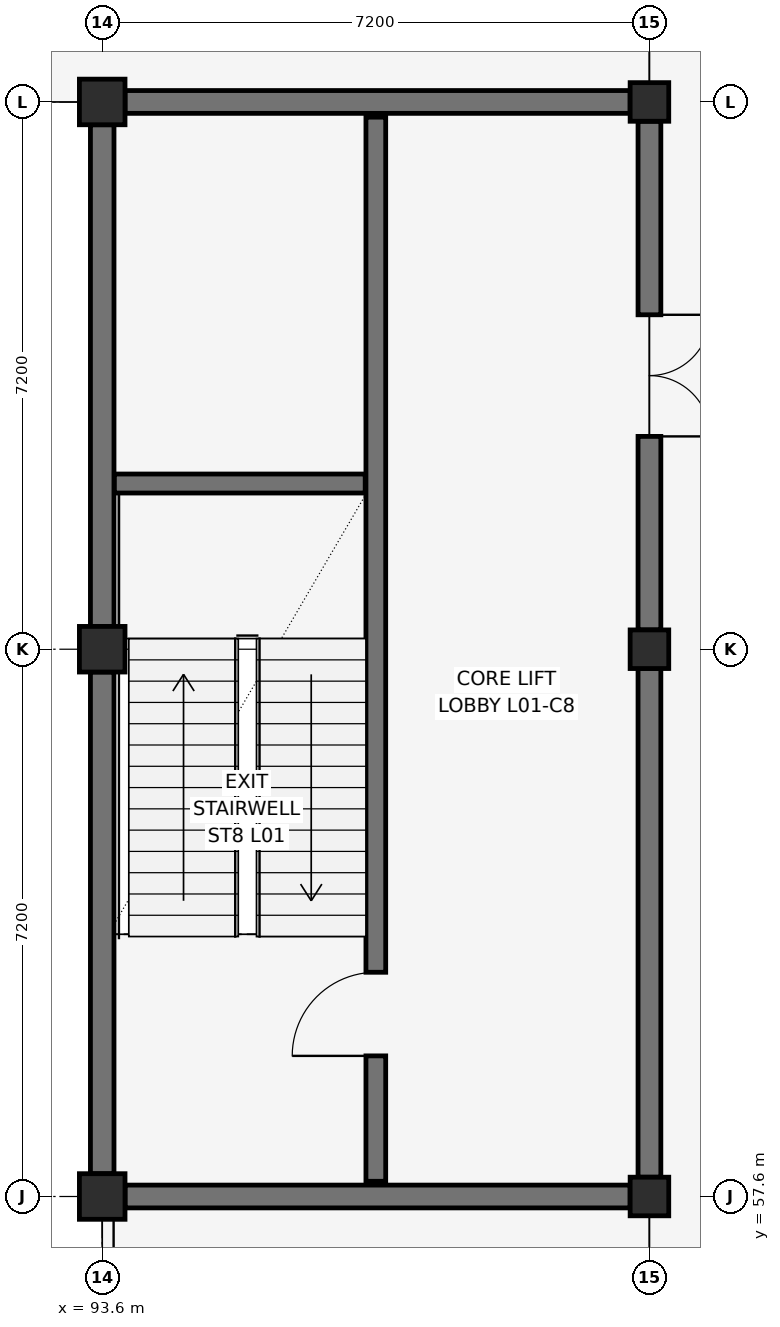
"""IFC4 building model, lengths in metres.
Left out: names, types, materials, properties, quantities, classifications, styles, units other than length and angle.
Written with IfcOpenShell. Run it as: python <this file> out.ifc"""

import sys

from ifc_helpers import new_model, si_unit, direction, frame, frame_2d, origin, origin_2d, place, context, subcontext, project, spatial, rectangle, hollow_circle, extrude, element, fill, save


model = new_model("IFC4")
c1 = context("Model", 3, precision=1e-05, world=origin(), true_north=direction((0.0, 1.0)))
c2 = subcontext(c1, "Body", "Model", "MODEL_VIEW")
j1 = project(units=[si_unit("LENGTHUNIT", "METRE"), si_unit("PLANEANGLEUNIT", "RADIAN")], contexts=[c1])
p1 = place(None, origin())
s1 = spatial("IfcSite", under=j1, at=p1, CompositionType="ELEMENT")
p2 = place(p1, origin())
s2 = spatial("IfcBuilding", under=s1, at=p2, CompositionType="ELEMENT")
p3 = place(p2, frame((0.0, 0.0, 5.4)))
s3 = spatial("IfcBuildingStorey", under=s2, at=p3, CompositionType="ELEMENT", Elevation=5.4)
for number, where, z_axis, x_axis in (
    (1, (93.6, 57.6, 0.0), (0.0, 0.0, 1.0), (1.0, 0.0, 0.0)),
    (2, (93.6, 64.8, 0.0), (0.0, 0.0, 1.0), (1.0, 0.0, 0.0)),
    (3, (93.6, 72.0, 0.0), (0.0, 0.0, 1.0), (1.0, 0.0, 0.0)),
):
    element("IfcColumn", number, at=place(p3, frame(where, z_axis=z_axis, x_axis=x_axis)), inside=s3, PredefinedType="COLUMN", context=c2, shape_type="SweptSolid", body=[
        extrude(rectangle(XDim=0.6, YDim=0.6, at=origin_2d()), origin(), (0.0, 0.0, 1.0), 4.8),
    ])
for number, where, z_axis, x_axis in (
    (4, (100.8, 57.6, 0.0), (0.0, 0.0, 1.0), (1.0, 0.0, 0.0)),
    (5, (100.8, 64.8, 0.0), (0.0, 0.0, 1.0), (1.0, 0.0, 0.0)),
    (6, (100.8, 72.0, 0.0), (0.0, 0.0, 1.0), (1.0, 0.0, 0.0)),
):
    element("IfcColumn", number, at=place(p3, frame(where, z_axis=z_axis, x_axis=x_axis)), inside=s3, PredefinedType="COLUMN", context=c2, shape_type="SweptSolid", body=[
        extrude(hollow_circle(Radius=0.254, WallThickness=0.022, at=origin_2d()), origin(), (0.0, 0.0, 1.0), 4.8),
    ])
for number, where, z_axis, x_axis in (
    (7, (93.9, 57.6, 0.0), (0.0, 0.0, 1.0), (1.0, 0.0, 0.0)),
    (8, (93.9, 72.0, 0.0), (0.0, 0.0, 1.0), (1.0, 0.0, 0.0)),
):
    element("IfcWall", number, at=place(p3, frame(where, z_axis=z_axis, x_axis=x_axis)), inside=s3, PredefinedType="SHEAR", context=c2, shape_type="SweptSolid", body=[
        extrude(rectangle(XDim=6.646, YDim=0.3, at=frame_2d((3.323, 0.0))), origin(), (0.0, 0.0, 1.0), 4.54),
    ])
p4 = place(p3, frame((93.6, 57.9, 0.0), z_axis=(0.0, 0.0, 1.0), x_axis=(0.0, 1.0, 0.0)))
e9 = element("IfcWall", 9, at=p4, inside=s3, PredefinedType="SHEAR", context=c2, shape_type="SweptSolid", body=[
    extrude(rectangle(XDim=6.6, YDim=0.31, at=frame_2d((3.3, 0.0))), origin(), (0.0, 0.0, 1.0), 4.54),
])
p5 = place(p3, frame((93.6, 65.1, 0.0), z_axis=(0.0, 0.0, 1.0), x_axis=(0.0, 1.0, 0.0)))
e10 = element("IfcWall", 10, at=p5, inside=s3, PredefinedType="SHEAR", context=c2, shape_type="SweptSolid", body=[
    extrude(rectangle(XDim=6.6, YDim=0.31, at=frame_2d((3.3, 0.0))), origin(), (0.0, 0.0, 1.0), 4.54),
])
p6 = place(p3, frame((100.8, 57.854, 0.0), z_axis=(0.0, 0.0, 1.0), x_axis=(0.0, 1.0, 0.0)))
e11 = element("IfcWall", 11, at=p6, inside=s3, PredefinedType="SHEAR", context=c2, shape_type="SweptSolid", body=[
    extrude(rectangle(XDim=6.692, YDim=0.3, at=frame_2d((3.346, 0.0))), origin(), (0.0, 0.0, 1.0), 4.54),
])
p7 = place(p3, frame((100.8, 65.054, 0.0), z_axis=(0.0, 0.0, 1.0), x_axis=(0.0, 1.0, 0.0)))
e12 = element("IfcWall", 12, at=p7, inside=s3, PredefinedType="SHEAR", context=c2, shape_type="SweptSolid", body=[
    extrude(rectangle(XDim=6.692, YDim=0.3, at=frame_2d((3.346, 0.0))), origin(), (0.0, 0.0, 1.0), 4.54),
])
p8 = place(p7, frame((2.546, 0.0, 0.0)))
e13 = element("IfcOpeningElement", 13, at=p8, cuts=e12, PredefinedType="OPENING", context=c2, shape_type="SweptSolid", body=[
    extrude(rectangle(XDim=1.6, YDim=2.2, at=frame_2d((0.8, 1.1))), frame((0.0, 0.165, 0.0), z_axis=(0.0, -1.0, 0.0), x_axis=(1.0, 0.0, 0.0)), (0.0, 0.0, 1.0), 0.33),
])
p9 = place(p3, frame((97.2, 57.8, 0.0), z_axis=(0.0, 0.0, 1.0), x_axis=(0.0, 1.0, 0.0)))
e14 = element("IfcWall", 14, at=p9, inside=s3, PredefinedType="SHEAR", context=c2, shape_type="SweptSolid", body=[
    extrude(rectangle(XDim=14.0, YDim=0.26, at=frame_2d((7.0, 0.0))), origin(), (0.0, 0.0, 1.0), 4.54),
])
p10 = place(p9, frame((1.65, 0.0, 0.0)))
e15 = element("IfcOpeningElement", 15, at=p10, cuts=e14, PredefinedType="OPENING", context=c2, shape_type="SweptSolid", body=[
    extrude(rectangle(XDim=1.1, YDim=2.15, at=frame_2d((0.55, 1.075))), frame((0.0, 0.145, 0.0), z_axis=(0.0, -1.0, 0.0), x_axis=(1.0, 0.0, 0.0)), (0.0, 0.0, 1.0), 0.29),
])
p11 = place(p3, frame((93.76, 66.98, 0.0), z_axis=(0.0, 0.0, 1.0), x_axis=(1.0, 0.0, 0.0)))
e16 = element("IfcWall", 16, at=p11, inside=s3, PredefinedType="SHEAR", context=c2, shape_type="SweptSolid", body=[
    extrude(rectangle(XDim=3.3, YDim=0.25, at=frame_2d((1.65, 0.0))), origin(), (0.0, 0.0, 1.0), 4.54),
])
p12 = place(p10, origin())
e17 = element("IfcDoor", 17, at=p12, inside=s3, OperationType="SINGLE_SWING_LEFT", PredefinedType="DOOR", context=c2, shape_type="SweptSolid", body=[
    extrude(rectangle(XDim=1.1, YDim=2.15, at=frame_2d((0.55, 1.075))), frame((0.0, 0.025, 0.0), z_axis=(0.0, -1.0, 0.0), x_axis=(1.0, 0.0, 0.0)), (0.0, 0.0, 1.0), 0.05),
])
fill(e15, e17)
p13 = place(p8, frame((1.6, 0.0, 0.0), z_axis=(0.0, 0.0, 1.0), x_axis=(-1.0, 0.0, 0.0)))
e18 = element("IfcDoor", 18, at=p13, inside=s3, OperationType="DOUBLE_SWING_LEFT", PredefinedType="DOOR", context=c2, shape_type="SweptSolid", body=[
    extrude(rectangle(XDim=1.6, YDim=2.2, at=frame_2d((0.8, 1.1))), frame((0.0, 0.025, 0.0), z_axis=(0.0, -1.0, 0.0), x_axis=(1.0, 0.0, 0.0)), (0.0, 0.0, 1.0), 0.05),
])
fill(e13, e18)
save(model, sys.argv[1])
